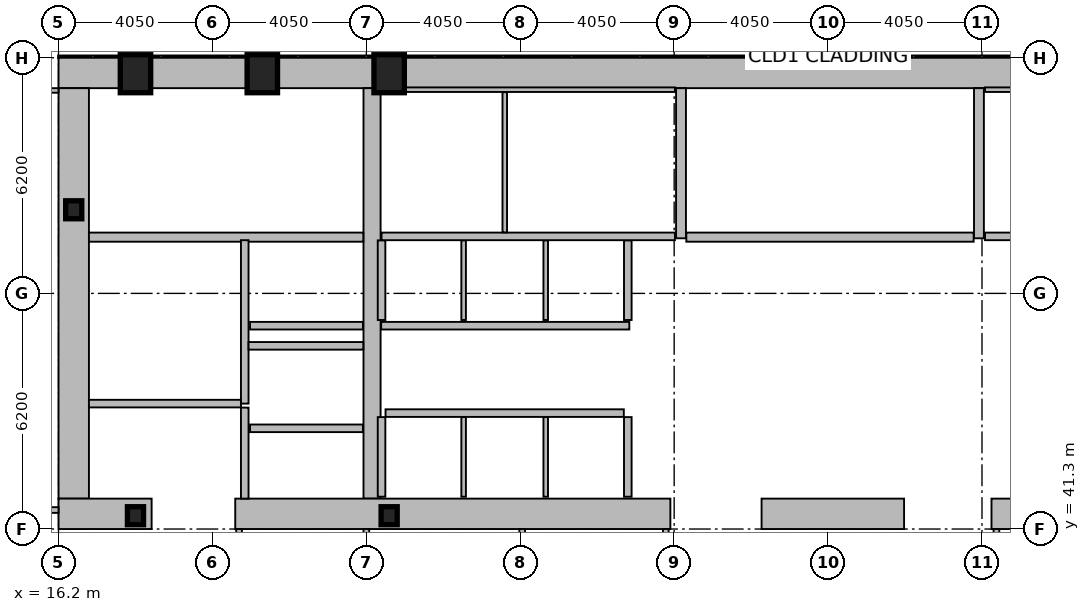
"""IFC4 building model, lengths in metres.
Left out: names, types, materials, properties, quantities, classifications, styles, units other than length and angle.
Written with IfcOpenShell. Run it as: python <this file> out.ifc"""

import sys

from ifc_helpers import new_model, si_unit, direction, frame, frame_2d, origin, origin_2d, place, context, subcontext, project, spatial, rectangle, hollow_rectangle, i_section, extrude, element, fill, save


model = new_model("IFC4")
c1 = context("Model", 3, precision=1e-05, world=origin(), true_north=direction((0.0, 1.0)))
c2 = subcontext(c1, "Body", "Model", "MODEL_VIEW")
j1 = project(units=[si_unit("LENGTHUNIT", "METRE"), si_unit("PLANEANGLEUNIT", "RADIAN")], contexts=[c1])
p1 = place(None, origin())
s1 = spatial("IfcSite", under=j1, at=p1, CompositionType="ELEMENT")
p2 = place(p1, origin())
s2 = spatial("IfcBuilding", under=s1, at=p2, CompositionType="ELEMENT")
p3 = place(p2, frame((0.0, 0.0, 25.8)))
s3 = spatial("IfcBuildingStorey", under=s2, at=p3, CompositionType="ELEMENT", Elevation=25.8)
p4 = place(p3, frame((16.2, 53.3, 0.0), z_axis=(0.0, 0.0, 1.0), x_axis=(1.0, 0.0, 0.0)))
e1 = element("IfcWall", 1, at=p4, inside=s3, PredefinedType="SHEAR", context=c2, shape_type="SweptSolid", body=[
    extrude(rectangle(XDim=40.5, YDim=0.8, at=frame_2d((20.25, 0.0))), origin(), (0.0, 0.0, 1.0), 3.82),
])
p5 = place(p3, frame((16.6, 42.1, 0.0), z_axis=(0.0, 0.0, 1.0), x_axis=(0.0, 1.0, 0.0)))
e2 = element("IfcWall", 2, at=p5, inside=s3, PredefinedType="SHEAR", context=c2, shape_type="SweptSolid", body=[
    extrude(rectangle(XDim=10.8, YDim=0.8, at=frame_2d((5.4, 0.0))), origin(), (0.0, 0.0, 1.0), 3.82),
])
p6 = place(p3, frame((24.45, 42.1, 0.0), z_axis=(0.0, 0.0, 1.0), x_axis=(0.0, 1.0, 0.0)))
e3 = element("IfcWall", 3, at=p6, inside=s3, PredefinedType="SHEAR", context=c2, shape_type="SweptSolid", body=[
    extrude(rectangle(XDim=10.8, YDim=0.45, at=frame_2d((5.4, 0.0))), origin(), (0.0, 0.0, 1.0), 3.82),
])
p7 = place(p3, frame((18.65, 41.7, 0.0), z_axis=(0.0, 0.0, 1.0), x_axis=(-1.0, 0.0, 0.0)))
e4 = element("IfcWall", 4, at=p7, inside=s3, PredefinedType="SHEAR", context=c2, shape_type="SweptSolid", body=[
    extrude(rectangle(XDim=2.45, YDim=0.8, at=frame_2d((1.225, 0.0))), origin(), (0.0, 0.0, 1.0), 3.82),
])
p8 = place(p3, frame((32.3, 41.7, 0.0), z_axis=(0.0, 0.0, 1.0), x_axis=(-1.0, 0.0, 0.0)))
e5 = element("IfcWall", 5, at=p8, inside=s3, PredefinedType="SHEAR", context=c2, shape_type="SweptSolid", body=[
    extrude(rectangle(XDim=11.45, YDim=0.8, at=frame_2d((5.725, 0.0))), origin(), (0.0, 0.0, 1.0), 3.82),
])
p9 = place(p3, frame((38.45, 41.7, 0.0), z_axis=(0.0, 0.0, 1.0), x_axis=(-1.0, 0.0, 0.0)))
e6 = element("IfcWall", 6, at=p9, inside=s3, PredefinedType="SHEAR", context=c2, shape_type="SweptSolid", body=[
    extrude(rectangle(XDim=3.75, YDim=0.8, at=frame_2d((1.875, 0.0))), origin(), (0.0, 0.0, 1.0), 3.82),
])
p10 = place(p3, frame((52.05, 41.7, 0.0), z_axis=(0.0, 0.0, 1.0), x_axis=(-1.0, 0.0, 0.0)))
e7 = element("IfcWall", 7, at=p10, inside=s3, PredefinedType="SHEAR", context=c2, shape_type="SweptSolid", body=[
    extrude(rectangle(XDim=11.3, YDim=0.8, at=frame_2d((5.65, 0.0))), origin(), (0.0, 0.0, 1.0), 3.82),
])
for number, where, z_axis, x_axis in (
    (8, (32.58, 48.95, 0.0), (0.0, 0.0, 1.0), (0.0, 1.0, 0.0)),
    (9, (40.42, 48.95, 0.0), (0.0, 0.0, 1.0), (0.0, 1.0, 0.0)),
):
    element("IfcWall", number, at=place(p3, frame(where, z_axis=z_axis, x_axis=x_axis)), inside=s3, PredefinedType="SHEAR", context=c2, shape_type="SweptSolid", body=[
        extrude(rectangle(XDim=3.95, YDim=0.26, at=frame_2d((1.975, 0.0))), origin(), (0.0, 0.0, 1.0), 3.82),
    ])
p11 = place(p3, frame((17.0, 48.98, 0.0), z_axis=(0.0, 0.0, 1.0), x_axis=(1.0, 0.0, 0.0)))
e10 = element("IfcWall", 10, at=p11, inside=s3, PredefinedType="SHEAR", context=c2, shape_type="SweptSolid", body=[
    extrude(rectangle(XDim=7.22, YDim=0.24, at=frame_2d((3.61, 0.0))), origin(), (0.0, 0.0, 1.0), 3.82),
])
p12 = place(p11, frame((0.22, 0.0, 0.0)))
e11 = element("IfcOpeningElement", 11, at=p12, cuts=e10, PredefinedType="OPENING", context=c2, shape_type="SweptSolid", body=[
    extrude(rectangle(XDim=1.05, YDim=2.15, at=frame_2d((0.525, 1.075))), frame((0.0, 0.13, 0.0), z_axis=(0.0, -1.0, 0.0), x_axis=(1.0, 0.0, 0.0)), (0.0, 0.0, 1.0), 0.26),
])
p13 = place(p3, frame((32.72, 48.98, 0.0), z_axis=(0.0, 0.0, 1.0), x_axis=(1.0, 0.0, 0.0)))
e12 = element("IfcWall", 12, at=p13, inside=s3, PredefinedType="SHEAR", context=c2, shape_type="SweptSolid", body=[
    extrude(rectangle(XDim=7.56, YDim=0.24, at=frame_2d((3.78, 0.0))), origin(), (0.0, 0.0, 1.0), 3.82),
])
p14 = place(p13, frame((0.22, 0.0, 0.0)))
e13 = element("IfcOpeningElement", 13, at=p14, cuts=e12, PredefinedType="OPENING", context=c2, shape_type="SweptSolid", body=[
    extrude(rectangle(XDim=1.05, YDim=2.15, at=frame_2d((0.525, 1.075))), frame((0.0, 0.13, 0.0), z_axis=(0.0, -1.0, 0.0), x_axis=(1.0, 0.0, 0.0)), (0.0, 0.0, 1.0), 0.26),
])
for number, where, z_axis, x_axis in (
    (14, (18.225, 53.28, 0.0), (0.0, 0.0, 1.0), (1.0, 0.0, 0.0)),
    (15, (21.562, 53.28, 0.0), (0.0, 0.0, 1.0), (1.0, 0.0, 0.0)),
    (16, (24.9, 53.28, 0.0), (0.0, 0.0, 1.0), (1.0, 0.0, 0.0)),
):
    element("IfcColumn", number, at=place(p3, frame(where, z_axis=z_axis, x_axis=x_axis)), inside=s3, PredefinedType="COLUMN", context=c2, shape_type="SweptSolid", body=[
        extrude(hollow_rectangle(XDim=0.8, YDim=1.0, WallThickness=0.055, at=origin_2d()), origin(), (0.0, 0.0, 1.0), 4.0),
    ])
for number, where, z_axis, x_axis in (
    (17, (16.6, 49.7, 0.0), (0.0, 0.0, 1.0), (1.0, 0.0, 0.0)),
    (18, (18.225, 41.65, 0.0), (0.0, 0.0, 1.0), (1.0, 0.0, 0.0)),
    (19, (24.9, 41.65, 0.0), (0.0, 0.0, 1.0), (1.0, 0.0, 0.0)),
):
    element("IfcColumn", number, at=place(p3, frame(where, z_axis=z_axis, x_axis=x_axis)), inside=s3, PredefinedType="COLUMN", context=c2, shape_type="SweptSolid", body=[
        extrude(i_section(OverallWidth=0.424, OverallDepth=0.474, WebThickness=0.048, FlangeThickness=0.077, at=origin_2d()), origin(), (0.0, 0.0, 1.0), 4.0),
    ])
p15 = place(p3, frame((24.21, 43.95, 0.0), z_axis=(0.0, 0.0, 1.0), x_axis=(-1.0, 0.0, 0.0)))
e20 = element("IfcWall", 20, at=p15, inside=s3, PredefinedType="PARTITIONING", context=c2, shape_type="SweptSolid", body=[
    extrude(rectangle(XDim=2.97, YDim=0.2, at=frame_2d((1.485, 0.0))), origin(), (0.0, 0.0, 1.0), 3.82),
])
p16 = place(p15, frame((0.86, 0.0, 0.0)))
e21 = element("IfcOpeningElement", 21, at=p16, cuts=e20, PredefinedType="OPENING", context=c2, shape_type="SweptSolid", body=[
    extrude(rectangle(XDim=1.3, YDim=2.18, at=frame_2d((0.65, 1.09))), frame((0.0, 0.11, 0.0), z_axis=(0.0, -1.0, 0.0), x_axis=(1.0, 0.0, 0.0)), (0.0, 0.0, 1.0), 0.22),
])
p17 = place(p3, frame((24.21, 46.65, 0.0), z_axis=(0.0, 0.0, 1.0), x_axis=(-1.0, 0.0, 0.0)))
e22 = element("IfcWall", 22, at=p17, inside=s3, PredefinedType="PARTITIONING", context=c2, shape_type="SweptSolid", body=[
    extrude(rectangle(XDim=2.97, YDim=0.2, at=frame_2d((1.485, 0.0))), origin(), (0.0, 0.0, 1.0), 3.82),
])
p18 = place(p17, frame((0.91, 0.0, 0.0)))
e23 = element("IfcOpeningElement", 23, at=p18, cuts=e22, PredefinedType="OPENING", context=c2, shape_type="SweptSolid", body=[
    extrude(rectangle(XDim=1.2, YDim=2.18, at=frame_2d((0.6, 1.09))), frame((0.0, 0.11, 0.0), z_axis=(0.0, -1.0, 0.0), x_axis=(1.0, 0.0, 0.0)), (0.0, 0.0, 1.0), 0.22),
])
p19 = place(p3, frame((31.22, 46.65, 0.0), z_axis=(0.0, 0.0, 1.0), x_axis=(-1.0, 0.0, 0.0)))
e24 = element("IfcWall", 24, at=p19, inside=s3, PredefinedType="PARTITIONING", context=c2, shape_type="SweptSolid", body=[
    extrude(rectangle(XDim=6.53, YDim=0.2, at=frame_2d((3.265, 0.0))), origin(), (0.0, 0.0, 1.0), 3.82),
])
p20 = place(p19, frame((4.9, 0.0, 0.0)))
e25 = element("IfcOpeningElement", 25, at=p20, cuts=e24, PredefinedType="OPENING", context=c2, shape_type="SweptSolid", body=[
    extrude(rectangle(XDim=1.1, YDim=2.18, at=frame_2d((0.55, 1.09))), frame((0.0, 0.11, 0.0), z_axis=(0.0, -1.0, 0.0), x_axis=(1.0, 0.0, 0.0)), (0.0, 0.0, 1.0), 0.22),
])
p21 = place(p19, frame((2.74, 0.0, 0.0)))
e26 = element("IfcOpeningElement", 26, at=p21, cuts=e24, PredefinedType="OPENING", context=c2, shape_type="SweptSolid", body=[
    extrude(rectangle(XDim=1.1, YDim=2.18, at=frame_2d((0.55, 1.09))), frame((0.0, 0.11, 0.0), z_axis=(0.0, -1.0, 0.0), x_axis=(1.0, 0.0, 0.0)), (0.0, 0.0, 1.0), 0.22),
])
p22 = place(p19, frame((0.58, 0.0, 0.0)))
e27 = element("IfcOpeningElement", 27, at=p22, cuts=e24, PredefinedType="OPENING", context=c2, shape_type="SweptSolid", body=[
    extrude(rectangle(XDim=1.1, YDim=2.18, at=frame_2d((0.55, 1.09))), frame((0.0, 0.11, 0.0), z_axis=(0.0, -1.0, 0.0), x_axis=(1.0, 0.0, 0.0)), (0.0, 0.0, 1.0), 0.22),
])
p23 = place(p3, frame((21.1, 44.6, 0.0), z_axis=(0.0, 0.0, 1.0), x_axis=(0.0, 1.0, 0.0)))
e28 = element("IfcWall", 28, at=p23, inside=s3, PredefinedType="PARTITIONING", context=c2, shape_type="SweptSolid", body=[
    extrude(rectangle(XDim=4.3, YDim=0.2, at=frame_2d((2.15, 0.0))), origin(), (0.0, 0.0, 1.0), 3.82),
])
p24 = place(p3, frame((17.0, 44.6, 0.0), z_axis=(0.0, 0.0, 1.0), x_axis=(1.0, 0.0, 0.0)))
e29 = element("IfcWall", 29, at=p24, inside=s3, PredefinedType="PARTITIONING", context=c2, shape_type="SweptSolid", body=[
    extrude(rectangle(XDim=4.0, YDim=0.2, at=frame_2d((2.0, 0.0))), origin(), (0.0, 0.0, 1.0), 3.82),
])
p25 = place(p24, frame((1.25, 0.0, 0.0)))
e30 = element("IfcOpeningElement", 30, at=p25, cuts=e29, PredefinedType="OPENING", context=c2, shape_type="SweptSolid", body=[
    extrude(rectangle(XDim=1.05, YDim=2.15, at=frame_2d((0.525, 1.075))), frame((0.0, 0.11, 0.0), z_axis=(0.0, -1.0, 0.0), x_axis=(1.0, 0.0, 0.0)), (0.0, 0.0, 1.0), 0.22),
])
p26 = place(p3, frame((21.2, 46.12, 0.0), z_axis=(0.0, 0.0, 1.0), x_axis=(1.0, 0.0, 0.0)))
e31 = element("IfcWall", 31, at=p26, inside=s3, PredefinedType="PARTITIONING", context=c2, shape_type="SweptSolid", body=[
    extrude(rectangle(XDim=3.02, YDim=0.2, at=frame_2d((1.51, 0.0))), origin(), (0.0, 0.0, 1.0), 3.82),
])
p27 = place(p3, frame((21.1, 42.1, 0.0), z_axis=(0.0, 0.0, 1.0), x_axis=(0.0, 1.0, 0.0)))
e32 = element("IfcWall", 32, at=p27, inside=s3, PredefinedType="PARTITIONING", context=c2, shape_type="SweptSolid", body=[
    extrude(rectangle(XDim=2.395, YDim=0.2, at=frame_2d((1.198, 0.0))), origin(), (0.0, 0.0, 1.0), 3.82),
])
p28 = place(p27, frame((0.38, 0.0, 0.0)))
e33 = element("IfcOpeningElement", 33, at=p28, cuts=e32, PredefinedType="OPENING", context=c2, shape_type="SweptSolid", body=[
    extrude(rectangle(XDim=1.05, YDim=2.15, at=frame_2d((0.525, 1.075))), frame((0.0, 0.11, 0.0), z_axis=(0.0, -1.0, 0.0), x_axis=(1.0, 0.0, 0.0)), (0.0, 0.0, 1.0), 0.22),
])
for number, where, z_axis, x_axis in (
    (34, (24.7, 46.8, 0.0), (0.0, 0.0, 1.0), (0.0, 1.0, 0.0)),
    (35, (31.18, 46.8, 0.0), (0.0, 0.0, 1.0), (0.0, 1.0, 0.0)),
):
    element("IfcWall", number, at=place(p3, frame(where, z_axis=z_axis, x_axis=x_axis)), inside=s3, PredefinedType="PARTITIONING", context=c2, shape_type="SweptSolid", body=[
        extrude(rectangle(XDim=2.095, YDim=0.2, at=frame_2d((1.047, 0.0))), origin(), (0.0, 0.0, 1.0), 3.82),
    ])
for number, where, z_axis, x_axis in (
    (36, (26.86, 46.8, 0.0), (0.0, 0.0, 1.0), (0.0, 1.0, 0.0)),
    (37, (29.02, 46.8, 0.0), (0.0, 0.0, 1.0), (0.0, 1.0, 0.0)),
):
    element("IfcWall", number, at=place(p3, frame(where, z_axis=z_axis, x_axis=x_axis)), inside=s3, PredefinedType="PARTITIONING", context=c2, shape_type="SweptSolid", body=[
        extrude(rectangle(XDim=2.095, YDim=0.12, at=frame_2d((1.047, 0.0))), origin(), (0.0, 0.0, 1.0), 3.82),
    ])
p29 = place(p3, frame((24.805, 44.35, 0.0), z_axis=(0.0, 0.0, 1.0), x_axis=(1.0, 0.0, 0.0)))
e38 = element("IfcWall", 38, at=p29, inside=s3, PredefinedType="PARTITIONING", context=c2, shape_type="SweptSolid", body=[
    extrude(rectangle(XDim=6.27, YDim=0.2, at=frame_2d((3.135, 0.0))), origin(), (0.0, 0.0, 1.0), 3.82),
])
for number, where, z_axis, x_axis in (
    (39, (24.7, 42.15, 0.0), (0.0, 0.0, 1.0), (0.0, 1.0, 0.0)),
    (40, (31.18, 42.15, 0.0), (0.0, 0.0, 1.0), (0.0, 1.0, 0.0)),
):
    element("IfcWall", number, at=place(p3, frame(where, z_axis=z_axis, x_axis=x_axis)), inside=s3, PredefinedType="PARTITIONING", context=c2, shape_type="SweptSolid", body=[
        extrude(rectangle(XDim=2.095, YDim=0.2, at=frame_2d((1.048, 0.0))), origin(), (0.0, 0.0, 1.0), 3.82),
    ])
for number, where, z_axis, x_axis in (
    (41, (26.86, 42.15, 0.0), (0.0, 0.0, 1.0), (0.0, 1.0, 0.0)),
    (42, (29.02, 42.15, 0.0), (0.0, 0.0, 1.0), (0.0, 1.0, 0.0)),
):
    element("IfcWall", number, at=place(p3, frame(where, z_axis=z_axis, x_axis=x_axis)), inside=s3, PredefinedType="PARTITIONING", context=c2, shape_type="SweptSolid", body=[
        extrude(rectangle(XDim=2.095, YDim=0.12, at=frame_2d((1.048, 0.0))), origin(), (0.0, 0.0, 1.0), 3.82),
    ])
p30 = place(p3, frame((24.7, 52.86, 0.0), z_axis=(0.0, 0.0, 1.0), x_axis=(1.0, 0.0, 0.0)))
e43 = element("IfcWall", 43, at=p30, inside=s3, PredefinedType="PARTITIONING", context=c2, shape_type="SweptSolid", body=[
    extrude(rectangle(XDim=7.72, YDim=0.12, at=frame_2d((3.86, 0.0))), origin(), (0.0, 0.0, 1.0), 3.82),
])
p31 = place(p3, frame((24.7, 49.0, 0.0), z_axis=(0.0, 0.0, 1.0), x_axis=(1.0, 0.0, 0.0)))
e44 = element("IfcWall", 44, at=p31, inside=s3, PredefinedType="PARTITIONING", context=c2, shape_type="SweptSolid", body=[
    extrude(rectangle(XDim=7.72, YDim=0.2, at=frame_2d((3.86, 0.0))), origin(), (0.0, 0.0, 1.0), 3.82),
])
p32 = place(p31, frame((6.56, 0.0, 0.0)))
e45 = element("IfcOpeningElement", 45, at=p32, cuts=e44, PredefinedType="OPENING", context=c2, shape_type="SweptSolid", body=[
    extrude(rectangle(XDim=0.95, YDim=2.1, at=frame_2d((0.475, 1.05))), frame((0.0, 0.11, 0.0), z_axis=(0.0, -1.0, 0.0), x_axis=(1.0, 0.0, 0.0)), (0.0, 0.0, 1.0), 0.22),
])
p33 = place(p3, frame((27.942, 49.105, 0.0), z_axis=(0.0, 0.0, 1.0), x_axis=(0.0, 1.0, 0.0)))
e46 = element("IfcWall", 46, at=p33, inside=s3, PredefinedType="PARTITIONING", context=c2, shape_type="SweptSolid", body=[
    extrude(rectangle(XDim=3.69, YDim=0.12, at=frame_2d((1.845, 0.0))), origin(), (0.0, 0.0, 1.0), 3.82),
])
p34 = place(p33, frame((1.05, 0.0, 0.0)))
e47 = element("IfcOpeningElement", 47, at=p34, cuts=e46, PredefinedType="OPENING", context=c2, shape_type="SweptSolid", body=[
    extrude(rectangle(XDim=0.9, YDim=2.05, at=frame_2d((0.45, 1.025))), frame((0.0, 0.07, 0.0), z_axis=(0.0, -1.0, 0.0), x_axis=(1.0, 0.0, 0.0)), (0.0, 0.0, 1.0), 0.14),
])
p35 = place(p3, frame((40.58, 52.86, 0.0), z_axis=(0.0, 0.0, 1.0), x_axis=(1.0, 0.0, 0.0)))
e48 = element("IfcWall", 48, at=p35, inside=s3, PredefinedType="PARTITIONING", context=c2, shape_type="SweptSolid", body=[
    extrude(rectangle(XDim=7.56, YDim=0.12, at=frame_2d((3.78, 0.0))), origin(), (0.0, 0.0, 1.0), 3.82),
])
p36 = place(p3, frame((40.58, 49.0, 0.0), z_axis=(0.0, 0.0, 1.0), x_axis=(1.0, 0.0, 0.0)))
e49 = element("IfcWall", 49, at=p36, inside=s3, PredefinedType="PARTITIONING", context=c2, shape_type="SweptSolid", body=[
    extrude(rectangle(XDim=7.56, YDim=0.2, at=frame_2d((3.78, 0.0))), origin(), (0.0, 0.0, 1.0), 3.82),
])
p37 = place(p36, frame((0.16, 0.0, 0.0)))
e50 = element("IfcOpeningElement", 50, at=p37, cuts=e49, PredefinedType="OPENING", context=c2, shape_type="SweptSolid", body=[
    extrude(rectangle(XDim=0.95, YDim=2.1, at=frame_2d((0.475, 1.05))), frame((0.0, 0.11, 0.0), z_axis=(0.0, -1.0, 0.0), x_axis=(1.0, 0.0, 0.0)), (0.0, 0.0, 1.0), 0.22),
])
for number, where, z_axis, x_axis in (
    (51, (20.95, 38.28, 0.0), (0.0, 0.0, 1.0), (0.0, 1.0, 0.0)),
    (52, (24.3, 38.28, 0.0), (0.0, 0.0, 1.0), (0.0, 1.0, 0.0)),
    (53, (28.4, 38.28, 0.0), (0.0, 0.0, 1.0), (0.0, 1.0, 0.0)),
    (54, (32.18, 38.28, 0.0), (0.0, 0.0, 1.0), (0.0, 1.0, 0.0)),
    (55, (40.88, 38.28, 0.0), (0.0, 0.0, 1.0), (0.0, 1.0, 0.0)),
):
    element("IfcWall", number, at=place(p3, frame(where, z_axis=z_axis, x_axis=x_axis)), inside=s3, PredefinedType="PARTITIONING", context=c2, shape_type="SweptSolid", body=[
        extrude(rectangle(XDim=3.02, YDim=0.15, at=frame_2d((1.51, 0.0))), origin(), (0.0, 0.0, 1.0), 3.82),
    ])
p38 = place(p3, frame((2.095, 41.8, 0.0), z_axis=(0.0, 0.0, 1.0), x_axis=(1.0, 0.0, 0.0)))
e56 = element("IfcWall", 56, at=p38, inside=s3, PredefinedType="PARTITIONING", context=c2, shape_type="SweptSolid", body=[
    extrude(rectangle(XDim=14.105, YDim=0.15, at=frame_2d((7.052, 0.0))), origin(), (0.0, 0.0, 1.0), 3.82),
])
p39 = place(p38, frame((12.32, 0.0, 0.0)))
e57 = element("IfcOpeningElement", 57, at=p39, cuts=e56, PredefinedType="OPENING", context=c2, shape_type="SweptSolid", body=[
    extrude(rectangle(XDim=0.9, YDim=2.05, at=frame_2d((0.45, 1.025))), frame((0.0, 0.085, 0.0), z_axis=(0.0, -1.0, 0.0), x_axis=(1.0, 0.0, 0.0)), (0.0, 0.0, 1.0), 0.17),
])
p40 = place(p3, frame((2.095, 52.84, 0.0), z_axis=(0.0, 0.0, 1.0), x_axis=(1.0, 0.0, 0.0)))
e58 = element("IfcWall", 58, at=p40, inside=s3, PredefinedType="PARTITIONING", context=c2, shape_type="SweptSolid", body=[
    extrude(rectangle(XDim=14.105, YDim=0.12, at=frame_2d((7.052, 0.0))), origin(), (0.0, 0.0, 1.0), 3.82),
])
p41 = place(p12, origin())
e59 = element("IfcDoor", 59, at=p41, inside=s3, OperationType="SINGLE_SWING_LEFT", PredefinedType="DOOR", context=c2, shape_type="SweptSolid", body=[
    extrude(rectangle(XDim=1.05, YDim=2.15, at=frame_2d((0.525, 1.075))), frame((0.0, 0.025, 0.0), z_axis=(0.0, -1.0, 0.0), x_axis=(1.0, 0.0, 0.0)), (0.0, 0.0, 1.0), 0.05),
])
fill(e11, e59)
p42 = place(p14, origin())
e60 = element("IfcDoor", 60, at=p42, inside=s3, OperationType="SINGLE_SWING_LEFT", PredefinedType="DOOR", context=c2, shape_type="SweptSolid", body=[
    extrude(rectangle(XDim=1.05, YDim=2.15, at=frame_2d((0.525, 1.075))), frame((0.0, 0.025, 0.0), z_axis=(0.0, -1.0, 0.0), x_axis=(1.0, 0.0, 0.0)), (0.0, 0.0, 1.0), 0.05),
])
fill(e13, e60)
p43 = place(p16, origin())
e61 = element("IfcDoor", 61, at=p43, inside=s3, OperationType="SLIDING_TO_LEFT", PredefinedType="DOOR", context=c2, shape_type="SweptSolid", body=[
    extrude(rectangle(XDim=1.3, YDim=2.18, at=frame_2d((0.65, 1.09))), frame((0.0, 0.025, 0.0), z_axis=(0.0, -1.0, 0.0), x_axis=(1.0, 0.0, 0.0)), (0.0, 0.0, 1.0), 0.05),
])
fill(e21, e61)
p44 = place(p18, origin())
e62 = element("IfcDoor", 62, at=p44, inside=s3, OperationType="SLIDING_TO_LEFT", PredefinedType="DOOR", context=c2, shape_type="SweptSolid", body=[
    extrude(rectangle(XDim=1.2, YDim=2.18, at=frame_2d((0.6, 1.09))), frame((0.0, 0.025, 0.0), z_axis=(0.0, -1.0, 0.0), x_axis=(1.0, 0.0, 0.0)), (0.0, 0.0, 1.0), 0.05),
])
fill(e23, e62)
p45 = place(p20, origin())
e63 = element("IfcDoor", 63, at=p45, inside=s3, OperationType="SLIDING_TO_LEFT", PredefinedType="DOOR", context=c2, shape_type="SweptSolid", body=[
    extrude(rectangle(XDim=1.1, YDim=2.18, at=frame_2d((0.55, 1.09))), frame((0.0, 0.025, 0.0), z_axis=(0.0, -1.0, 0.0), x_axis=(1.0, 0.0, 0.0)), (0.0, 0.0, 1.0), 0.05),
])
fill(e25, e63)
p46 = place(p21, origin())
e64 = element("IfcDoor", 64, at=p46, inside=s3, OperationType="SLIDING_TO_LEFT", PredefinedType="DOOR", context=c2, shape_type="SweptSolid", body=[
    extrude(rectangle(XDim=1.1, YDim=2.18, at=frame_2d((0.55, 1.09))), frame((0.0, 0.025, 0.0), z_axis=(0.0, -1.0, 0.0), x_axis=(1.0, 0.0, 0.0)), (0.0, 0.0, 1.0), 0.05),
])
fill(e26, e64)
p47 = place(p22, origin())
e65 = element("IfcDoor", 65, at=p47, inside=s3, OperationType="SLIDING_TO_LEFT", PredefinedType="DOOR", context=c2, shape_type="SweptSolid", body=[
    extrude(rectangle(XDim=1.1, YDim=2.18, at=frame_2d((0.55, 1.09))), frame((0.0, 0.025, 0.0), z_axis=(0.0, -1.0, 0.0), x_axis=(1.0, 0.0, 0.0)), (0.0, 0.0, 1.0), 0.05),
])
fill(e27, e65)
p48 = place(p25, origin())
e66 = element("IfcDoor", 66, at=p48, inside=s3, OperationType="SINGLE_SWING_RIGHT", PredefinedType="DOOR", context=c2, shape_type="SweptSolid", body=[
    extrude(rectangle(XDim=1.05, YDim=2.15, at=frame_2d((0.525, 1.075))), frame((0.0, 0.025, 0.0), z_axis=(0.0, -1.0, 0.0), x_axis=(1.0, 0.0, 0.0)), (0.0, 0.0, 1.0), 0.05),
])
fill(e30, e66)
p49 = place(p28, origin())
e67 = element("IfcDoor", 67, at=p49, inside=s3, OperationType="SINGLE_SWING_LEFT", PredefinedType="DOOR", context=c2, shape_type="SweptSolid", body=[
    extrude(rectangle(XDim=1.05, YDim=2.15, at=frame_2d((0.525, 1.075))), frame((0.0, 0.025, 0.0), z_axis=(0.0, -1.0, 0.0), x_axis=(1.0, 0.0, 0.0)), (0.0, 0.0, 1.0), 0.05),
])
fill(e33, e67)
p50 = place(p32, origin())
e68 = element("IfcDoor", 68, at=p50, inside=s3, OperationType="SINGLE_SWING_RIGHT", PredefinedType="DOOR", context=c2, shape_type="SweptSolid", body=[
    extrude(rectangle(XDim=0.95, YDim=2.1, at=frame_2d((0.475, 1.05))), frame((0.0, 0.025, 0.0), z_axis=(0.0, -1.0, 0.0), x_axis=(1.0, 0.0, 0.0)), (0.0, 0.0, 1.0), 0.05),
])
fill(e45, e68)
p51 = place(p34, origin())
e69 = element("IfcDoor", 69, at=p51, inside=s3, OperationType="SINGLE_SWING_LEFT", PredefinedType="DOOR", context=c2, shape_type="SweptSolid", body=[
    extrude(rectangle(XDim=0.9, YDim=2.05, at=frame_2d((0.45, 1.025))), frame((0.0, 0.025, 0.0), z_axis=(0.0, -1.0, 0.0), x_axis=(1.0, 0.0, 0.0)), (0.0, 0.0, 1.0), 0.05),
])
fill(e47, e69)
p52 = place(p37, origin())
e70 = element("IfcDoor", 70, at=p52, inside=s3, OperationType="SINGLE_SWING_RIGHT", PredefinedType="DOOR", context=c2, shape_type="SweptSolid", body=[
    extrude(rectangle(XDim=0.95, YDim=2.1, at=frame_2d((0.475, 1.05))), frame((0.0, 0.025, 0.0), z_axis=(0.0, -1.0, 0.0), x_axis=(1.0, 0.0, 0.0)), (0.0, 0.0, 1.0), 0.05),
])
fill(e50, e70)
save(model, sys.argv[1])
